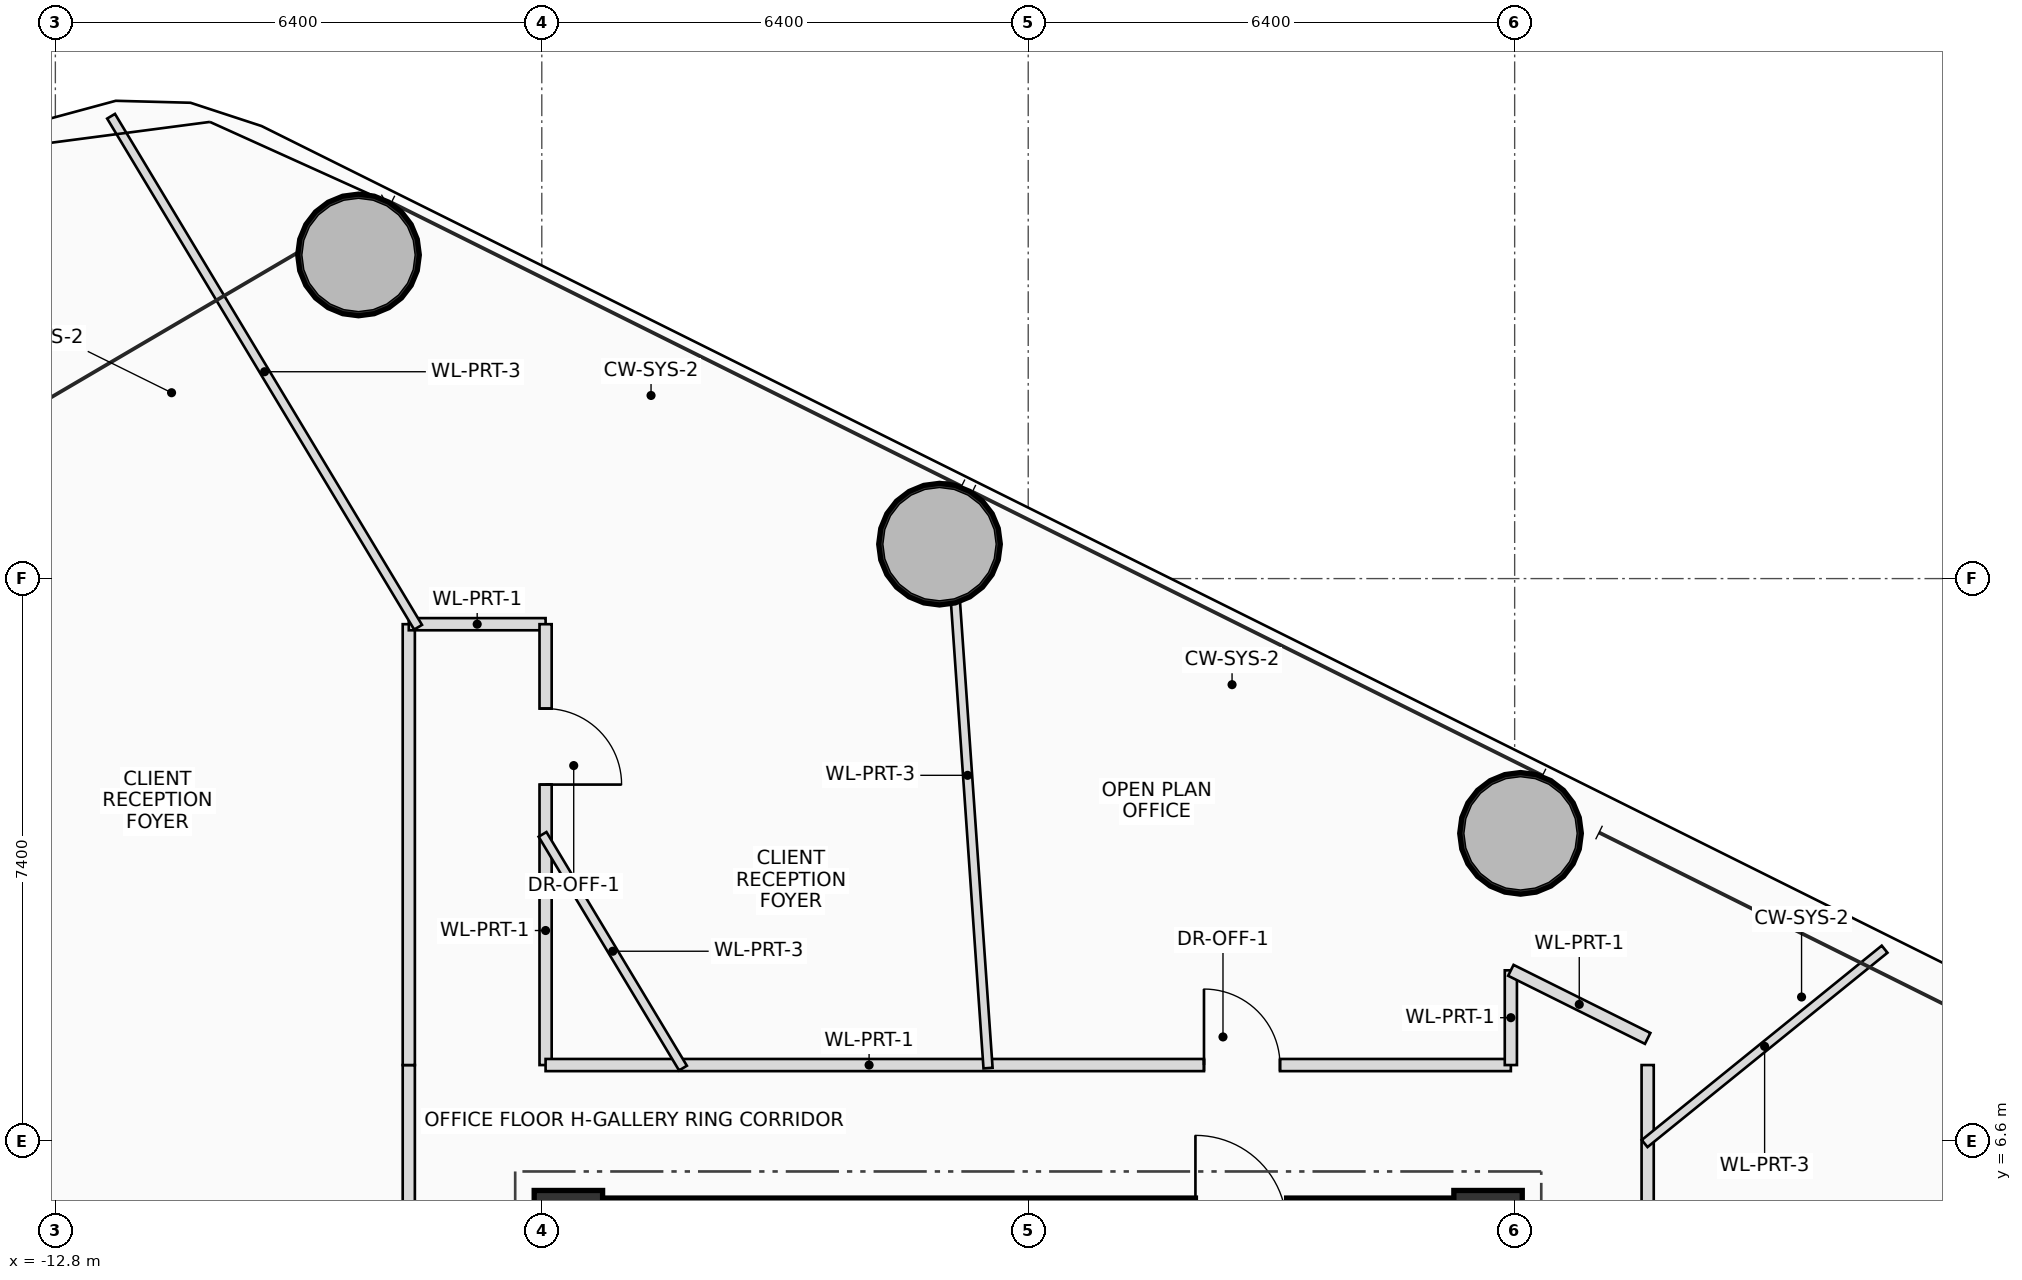
"""IFC4 building model, lengths in metres.
Left out: names, types, materials, properties, quantities, classifications, styles, units other than length and angle.
Written with IfcOpenShell. Run it as: python <this file> out.ifc"""

import sys

from ifc_helpers import new_model, si_unit, direction, frame, frame_2d, origin, origin_2d, place, context, subcontext, project, spatial, rectangle, hollow_circle, extrude, source, transform, mapped, element, fill, save


model = new_model("IFC4")
c1 = context("Model", 3, precision=1e-05, world=origin(), true_north=direction((0.0, 1.0)))
c2 = subcontext(c1, "Body", "Model", "MODEL_VIEW")
j1 = project(units=[si_unit("LENGTHUNIT", "METRE"), si_unit("PLANEANGLEUNIT", "RADIAN")], contexts=[c1])
p1 = place(None, origin())
s1 = spatial("IfcSite", under=j1, at=p1, CompositionType="ELEMENT")
p2 = place(p1, origin())
s2 = spatial("IfcBuilding", under=s1, at=p2, CompositionType="ELEMENT")
p3 = place(p2, frame((0.0, 0.0, 42.3)))
s3 = spatial("IfcBuildingStorey", under=s2, at=p3, CompositionType="ELEMENT", Elevation=42.3)
m1 = source(origin(), c2, "Body", "SweptSolid", [
    extrude(rectangle(XDim=0.9, YDim=0.9, at=origin_2d()), origin(), (0.0, 0.0, 1.0), 3.7),
])
for number, where, z_axis, x_axis in (
    (1, (6.05, 5.5, 0.0), (0.0, 0.0, 1.0), (1.0, 0.0, 0.0)),
    (2, (-6.05, 5.5, 0.0), (0.0, 0.0, 1.0), (1.0, 0.0, 0.0)),
):
    element("IfcColumn", number, at=place(p3, frame(where, z_axis=z_axis, x_axis=x_axis)), inside=s3, PredefinedType="COLUMN", context=c2, shape_type="MappedRepresentation", body=[
        mapped(m1, transform((0.0, 0.0, 0.0), scale=1.0)),
    ])
p4 = place(p3, frame((-6.4, 5.475, 0.0), z_axis=(0.0, 0.0, 1.0), x_axis=(1.0, 0.0, 0.0)))
e3 = element("IfcWall", 3, at=p4, inside=s3, PredefinedType="SHEAR", context=c2, shape_type="SweptSolid", body=[
    extrude(rectangle(XDim=12.8, YDim=0.75, at=frame_2d((6.4, 0.0))), origin(), (0.0, 0.0, 1.0), 3.7),
])
p5 = place(p4, frame((8.6, 0.0, 0.0)))
e4 = element("IfcOpeningElement", 4, at=p5, cuts=e3, PredefinedType="OPENING", context=c2, shape_type="SweptSolid", body=[
    extrude(rectangle(XDim=1.2, YDim=2.2, at=frame_2d((0.6, 1.1))), frame((0.0, 0.385, 0.0), z_axis=(0.0, -1.0, 0.0), x_axis=(1.0, 0.0, 0.0)), (0.0, 0.0, 1.0), 0.77),
])
m2 = source(origin(), c2, "Body", "SweptSolid", [
    extrude(hollow_circle(Radius=0.8, WallThickness=0.055, at=origin_2d()), origin(), (0.0, 0.0, 1.0), 3.7),
])
for number, where, z_axis, x_axis in (
    (5, (6.477, 10.648, 0.0), (0.0, 0.0, 1.0), (1.0, 0.0, 0.0)),
    (6, (-1.167, 14.453, 0.0), (0.0, 0.0, 1.0), (1.0, 0.0, 0.0)),
    (7, (-8.812, 18.258, 0.0), (0.0, 0.0, 1.0), (1.0, 0.0, 0.0)),
):
    element("IfcColumn", number, at=place(p3, frame(where, z_axis=z_axis, x_axis=x_axis)), inside=s3, PredefinedType="COLUMN", context=c2, shape_type="MappedRepresentation", body=[
        mapped(m2, transform((0.0, 0.0, 0.0), scale=1.0)),
    ])
p6 = place(p3, frame((-8.15, -7.6, 0.0), z_axis=(0.0, 0.0, 1.0), x_axis=(0.0, 1.0, 0.0)))
e8 = element("IfcWall", 8, at=p6, inside=s3, PredefinedType="PARTITIONING", context=c2, shape_type="SweptSolid", body=[
    extrude(rectangle(XDim=15.2, YDim=0.16, at=frame_2d((7.6, 0.0))), origin(), (0.0, 0.0, 1.0), 2.8),
])
p7 = place(p6, frame((6.109, 0.0, 0.0)))
e9 = element("IfcOpeningElement", 9, at=p7, cuts=e8, PredefinedType="OPENING", context=c2, shape_type="SweptSolid", body=[
    extrude(rectangle(XDim=1.0, YDim=2.25, at=frame_2d((0.5, 1.125))), frame((0.0, 0.09, 0.0), z_axis=(0.0, -1.0, 0.0), x_axis=(1.0, 0.0, 0.0)), (0.0, 0.0, 1.0), 0.18),
])
p8 = place(p6, frame((11.312, 0.0, 0.0)))
e10 = element("IfcOpeningElement", 10, at=p8, cuts=e8, PredefinedType="OPENING", context=c2, shape_type="SweptSolid", body=[
    extrude(rectangle(XDim=1.0, YDim=2.25, at=frame_2d((0.5, 1.125))), frame((0.0, 0.09, 0.0), z_axis=(0.0, -1.0, 0.0), x_axis=(1.0, 0.0, 0.0)), (0.0, 0.0, 1.0), 0.18),
])
p9 = place(p3, frame((-8.15, 7.6, 0.0), z_axis=(0.0, 0.0, 1.0), x_axis=(0.0, 1.0, 0.0)))
e11 = element("IfcWall", 11, at=p9, inside=s3, PredefinedType="PARTITIONING", context=c2, shape_type="SweptSolid", body=[
    extrude(rectangle(XDim=5.8, YDim=0.16, at=frame_2d((2.9, 0.0))), origin(), (0.0, 0.0, 1.0), 2.8),
])
p10 = place(p3, frame((-8.15, 13.4, 0.0), z_axis=(0.0, 0.0, 1.0), x_axis=(1.0, 0.0, 0.0)))
e12 = element("IfcWall", 12, at=p10, inside=s3, PredefinedType="PARTITIONING", context=c2, shape_type="SweptSolid", body=[
    extrude(rectangle(XDim=1.8, YDim=0.16, at=frame_2d((0.9, 0.0))), origin(), (0.0, 0.0, 1.0), 2.8),
])
p11 = place(p3, frame((-6.35, 13.4, 0.0), z_axis=(0.0, 0.0, 1.0), x_axis=(0.0, -1.0, 0.0)))
e13 = element("IfcWall", 13, at=p11, inside=s3, PredefinedType="PARTITIONING", context=c2, shape_type="SweptSolid", body=[
    extrude(rectangle(XDim=5.8, YDim=0.16, at=frame_2d((2.9, 0.0))), origin(), (0.0, 0.0, 1.0), 2.8),
])
p12 = place(p11, frame((1.11, 0.0, 0.0)))
e14 = element("IfcOpeningElement", 14, at=p12, cuts=e13, PredefinedType="OPENING", context=c2, shape_type="SweptSolid", body=[
    extrude(rectangle(XDim=1.0, YDim=2.25, at=frame_2d((0.5, 1.125))), frame((0.0, 0.09, 0.0), z_axis=(0.0, -1.0, 0.0), x_axis=(1.0, 0.0, 0.0)), (0.0, 0.0, 1.0), 0.18),
])
p13 = place(p3, frame((-6.35, 7.6, 0.0), z_axis=(0.0, 0.0, 1.0), x_axis=(1.0, 0.0, 0.0)))
e15 = element("IfcWall", 15, at=p13, inside=s3, PredefinedType="PARTITIONING", context=c2, shape_type="SweptSolid", body=[
    extrude(rectangle(XDim=12.7, YDim=0.16, at=frame_2d((6.35, 0.0))), origin(), (0.0, 0.0, 1.0), 2.8),
])
p14 = place(p13, frame((8.663, 0.0, 0.0)))
e16 = element("IfcOpeningElement", 16, at=p14, cuts=e15, PredefinedType="OPENING", context=c2, shape_type="SweptSolid", body=[
    extrude(rectangle(XDim=1.0, YDim=2.25, at=frame_2d((0.5, 1.125))), frame((0.0, 0.09, 0.0), z_axis=(0.0, -1.0, 0.0), x_axis=(1.0, 0.0, 0.0)), (0.0, 0.0, 1.0), 0.18),
])
p15 = place(p3, frame((6.35, 7.6, 0.0), z_axis=(0.0, 0.0, 1.0), x_axis=(0.0, 1.0, 0.0)))
e17 = element("IfcWall", 17, at=p15, inside=s3, PredefinedType="PARTITIONING", context=c2, shape_type="SweptSolid", body=[
    extrude(rectangle(XDim=1.246, YDim=0.16, at=frame_2d((0.623, 0.0))), origin(), (0.0, 0.0, 1.0), 2.8),
])
p16 = place(p3, frame((6.35, 8.846, 0.0), z_axis=(0.0, 0.0, 1.0), x_axis=(0.895251454268, -0.445561256879, 0.0)))
e18 = element("IfcWall", 18, at=p16, inside=s3, PredefinedType="PARTITIONING", context=c2, shape_type="SweptSolid", body=[
    extrude(rectangle(XDim=2.01, YDim=0.16, at=frame_2d((1.005, 0.0))), origin(), (0.0, 0.0, 1.0), 2.8),
])
p17 = place(p3, frame((8.15, 7.6, 0.0), z_axis=(0.0, 0.0, 1.0), x_axis=(0.0, -1.0, 0.0)))
e19 = element("IfcWall", 19, at=p17, inside=s3, PredefinedType="PARTITIONING", context=c2, shape_type="SweptSolid", body=[
    extrude(rectangle(XDim=7.58, YDim=0.16, at=frame_2d((3.79, 0.0))), origin(), (0.0, 0.0, 1.0), 2.8),
])
p18 = place(p17, frame((2.89, 0.0, 0.0)))
e20 = element("IfcOpeningElement", 20, at=p18, cuts=e19, PredefinedType="OPENING", context=c2, shape_type="SweptSolid", body=[
    extrude(rectangle(XDim=1.0, YDim=2.25, at=frame_2d((0.5, 1.125))), frame((0.0, 0.09, 0.0), z_axis=(0.0, -1.0, 0.0), x_axis=(1.0, 0.0, 0.0)), (0.0, 0.0, 1.0), 0.18),
])
p19 = place(p3, frame((8.11, 6.567, 0.0), z_axis=(0.0, 0.0, 1.0), x_axis=(0.777144107081, 0.629322681007, 0.0)))
e21 = element("IfcWall", 21, at=p19, inside=s3, PredefinedType="PARTITIONING", context=c2, shape_type="SweptSolid", body=[
    extrude(rectangle(XDim=4.063, YDim=0.12, at=frame_2d((2.031, 0.0))), origin(), (0.0, 0.0, 1.0), 2.96),
])
p20 = place(p3, frame((-0.529, 7.56, 0.0), z_axis=(0.0, 0.0, 1.0), x_axis=(-0.069775328769, 0.997562731609, 0.0)))
e22 = element("IfcWall", 22, at=p20, inside=s3, PredefinedType="PARTITIONING", context=c2, shape_type="SweptSolid", body=[
    extrude(rectangle(XDim=7.722, YDim=0.12, at=frame_2d((3.861, 0.0))), origin(), (0.0, 0.0, 1.0), 3.0),
])
p21 = place(p3, frame((-4.542, 7.56, 0.0), z_axis=(0.0, 0.0, 1.0), x_axis=(-0.515026141225, 0.85717447107, 0.0)))
e23 = element("IfcWall", 23, at=p21, inside=s3, PredefinedType="PARTITIONING", context=c2, shape_type="SweptSolid", body=[
    extrude(rectangle(XDim=3.587, YDim=0.12, at=frame_2d((1.793, 0.0))), origin(), (0.0, 0.0, 1.0), 2.8),
])
p22 = place(p3, frame((-8.028, 13.36, 0.0), z_axis=(0.0, 0.0, 1.0), x_axis=(-0.515031259007, 0.857171396073, 0.0)))
e24 = element("IfcWall", 24, at=p22, inside=s3, PredefinedType="PARTITIONING", context=c2, shape_type="SweptSolid", body=[
    extrude(rectangle(XDim=7.843, YDim=0.12, at=frame_2d((3.921, 0.0))), origin(), (0.0, 0.0, 1.0), 2.96),
])
p23 = place(p12, origin())
e25 = element("IfcDoor", 25, at=p23, inside=s3, OperationType="SINGLE_SWING_RIGHT", PredefinedType="DOOR", context=c2, shape_type="SweptSolid", body=[
    extrude(rectangle(XDim=1.0, YDim=2.25, at=frame_2d((0.5, 1.125))), frame((0.0, 0.025, 0.0), z_axis=(0.0, -1.0, 0.0), x_axis=(1.0, 0.0, 0.0)), (0.0, 0.0, 1.0), 0.05),
])
fill(e14, e25)
p24 = place(p14, origin())
e26 = element("IfcDoor", 26, at=p24, inside=s3, OperationType="SINGLE_SWING_LEFT", PredefinedType="DOOR", context=c2, shape_type="SweptSolid", body=[
    extrude(rectangle(XDim=1.0, YDim=2.25, at=frame_2d((0.5, 1.125))), frame((0.0, 0.025, 0.0), z_axis=(0.0, -1.0, 0.0), x_axis=(1.0, 0.0, 0.0)), (0.0, 0.0, 1.0), 0.05),
])
fill(e16, e26)
save(model, sys.argv[1])
